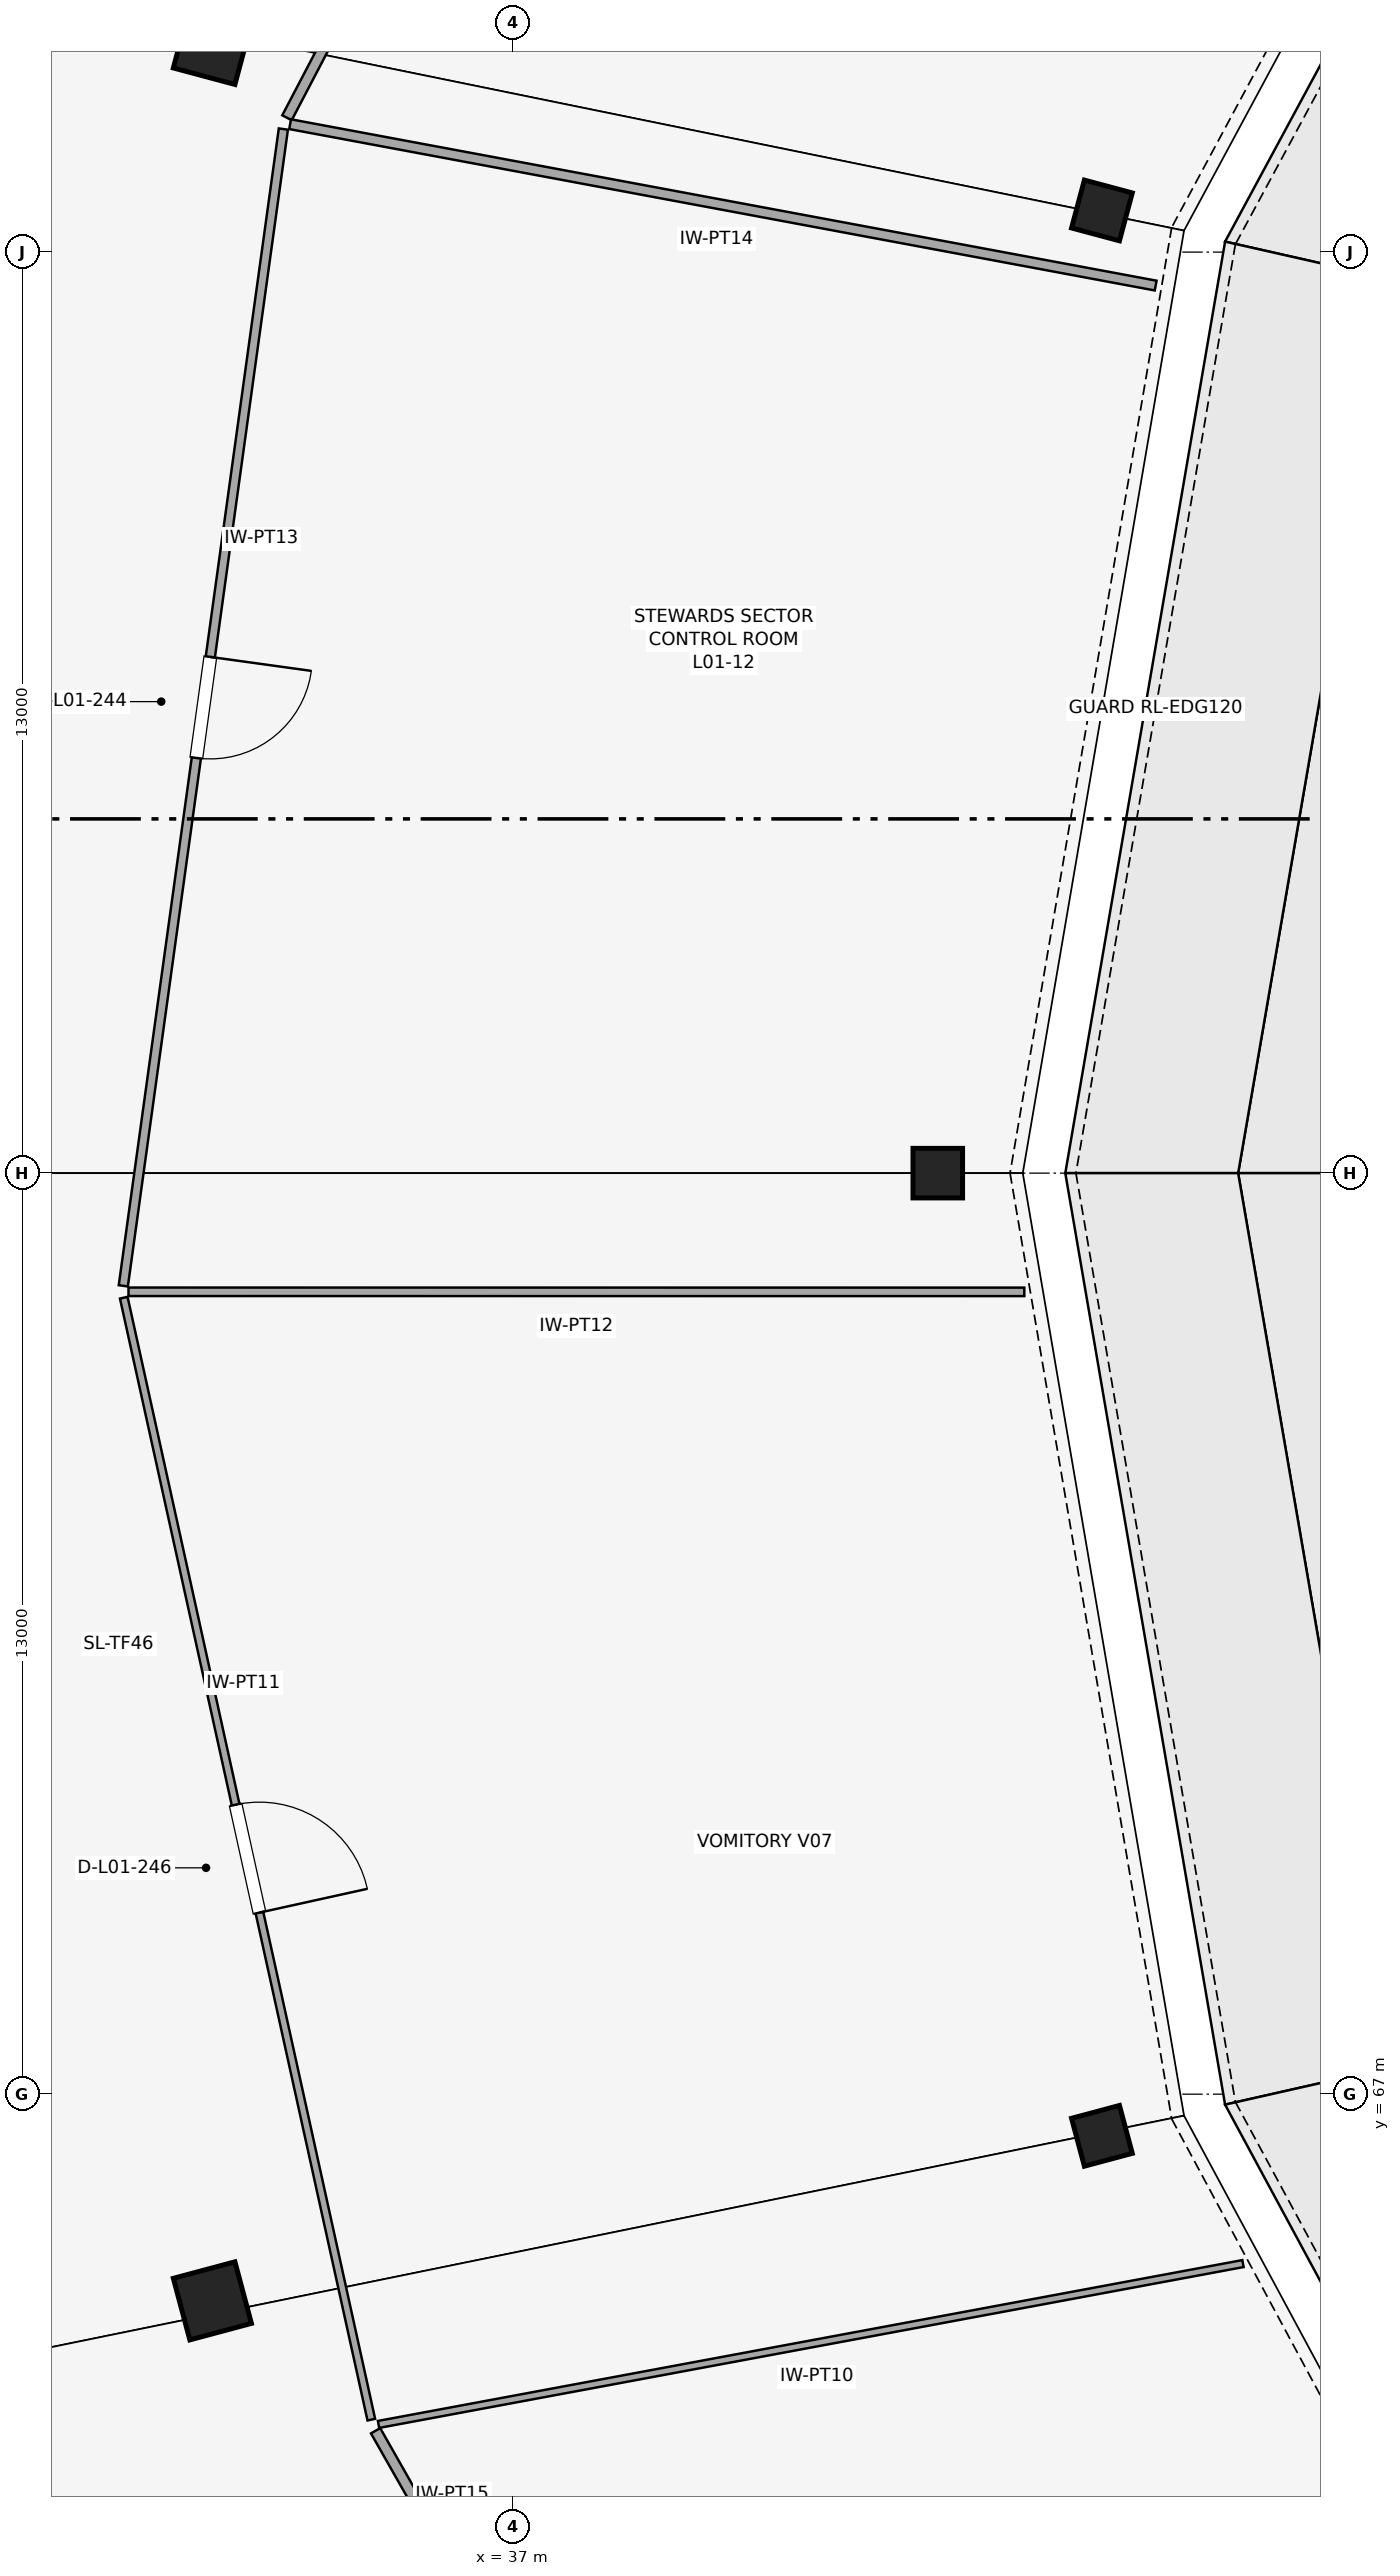
"""IFC4 building model, lengths in metres.
Left out: names, types, materials, properties, quantities, classifications, styles, units other than length and angle.
Written with IfcOpenShell. Run it as: python <this file> out.ifc"""

import sys

from ifc_helpers import new_model, si_unit, direction, frame, frame_2d, origin, origin_2d, place, context, subcontext, project, spatial, rectangle, extrude, element, fill, save


model = new_model("IFC4")
c1 = context("Model", 3, precision=1e-05, world=origin(), true_north=direction((0.0, 1.0)))
c2 = subcontext(c1, "Body", "Model", "MODEL_VIEW")
j1 = project(units=[si_unit("LENGTHUNIT", "METRE"), si_unit("PLANEANGLEUNIT", "RADIAN")], contexts=[c1])
p1 = place(None, origin())
s1 = spatial("IfcSite", under=j1, at=p1, CompositionType="ELEMENT")
p2 = place(p1, origin())
s2 = spatial("IfcBuilding", under=s1, at=p2, CompositionType="ELEMENT")
p3 = place(p2, frame((0.0, 0.0, 5.4)))
s3 = spatial("IfcBuildingStorey", under=s2, at=p3, CompositionType="ELEMENT", Elevation=5.4)
for number, where, z_axis, x_axis in (
    (1, (45.317, 93.588, 0.0), (0.0, 0.0, 1.0), (-0.966, 0.259, 0.0)),
    (2, (43.0, 80.0, 0.0), (0.0, 0.0, 1.0), (-1.0, 0.0, 0.0)),
    (3, (45.317, 66.412, 0.0), (0.0, 0.0, 1.0), (-0.966, -0.259, 0.0)),
):
    element("IfcColumn", number, at=place(p3, frame(where, z_axis=z_axis, x_axis=x_axis)), inside=s3, PredefinedType="COLUMN", context=c2, shape_type="SweptSolid", body=[
        extrude(rectangle(XDim=0.7, YDim=0.7, at=origin_2d()), origin(), (0.0, 0.0, 1.0), 5.2),
    ])
for number, where, z_axis, x_axis in (
    (4, (32.76, 95.917, 0.0), (0.0, 0.0, 1.0), (-0.966, 0.259, 0.0)),
    (5, (32.76, 64.083, 0.0), (0.0, 0.0, 1.0), (-0.966, -0.259, 0.0)),
):
    element("IfcColumn", number, at=place(p3, frame(where, z_axis=z_axis, x_axis=x_axis)), inside=s3, PredefinedType="COLUMN", context=c2, shape_type="SweptSolid", body=[
        extrude(rectangle(XDim=0.9, YDim=0.9, at=origin_2d()), origin(), (0.0, 0.0, 1.0), 5.2),
    ])
p4 = place(p3, frame((40.965, 108.551, 0.0), z_axis=(0.0, 0.0, 1.0), x_axis=(-0.463973851802, -0.88584889504, 0.0)))
e6 = element("IfcWall", 6, at=p4, inside=s3, PredefinedType="PARTITIONING", context=c2, shape_type="SweptSolid", body=[
    extrude(rectangle(XDim=15.414, YDim=0.15, at=frame_2d((7.707, 0.0))), origin(), (0.0, 0.0, 1.0), 3.67),
])
p5 = place(p4, frame((7.197, 0.0, 0.0)))
e7 = element("IfcOpeningElement", 7, at=p5, cuts=e6, PredefinedType="OPENING", context=c2, shape_type="SweptSolid", body=[
    extrude(rectangle(XDim=1.02, YDim=2.24, at=frame_2d((0.51, 1.12))), frame((0.0, 0.085, 0.0), z_axis=(0.0, -1.0, 0.0), x_axis=(1.0, 0.0, 0.0)), (0.0, 0.0, 1.0), 0.17),
])
p6 = place(p3, frame((46.075, 92.528, 0.0), z_axis=(0.0, 0.0, 1.0), x_axis=(-0.983061798628, 0.183274384678, 0.0)))
e8 = element("IfcWall", 8, at=p6, inside=s3, PredefinedType="PARTITIONING", context=c2, shape_type="SweptSolid", body=[
    extrude(rectangle(XDim=12.428, YDim=0.14, at=frame_2d((6.214, 0.0))), origin(), (0.0, 0.0, 1.0), 3.67),
])
p7 = place(p3, frame((33.762, 94.737, 0.0), z_axis=(0.0, 0.0, 1.0), x_axis=(-0.137065413617, -0.990561998257, 0.0)))
e9 = element("IfcWall", 9, at=p7, inside=s3, PredefinedType="PARTITIONING", context=c2, shape_type="SweptSolid", body=[
    extrude(rectangle(XDim=16.483, YDim=0.13, at=frame_2d((8.242, 0.0))), origin(), (0.0, 0.0, 1.0), 3.67),
])
p8 = place(p7, frame((7.521, 0.0, 0.0)))
e10 = element("IfcOpeningElement", 10, at=p8, cuts=e9, PredefinedType="OPENING", context=c2, shape_type="SweptSolid", body=[
    extrude(rectangle(XDim=1.44, YDim=2.24, at=frame_2d((0.72, 1.12))), frame((0.0, 0.075, 0.0), z_axis=(0.0, -1.0, 0.0), x_axis=(1.0, 0.0, 0.0)), (0.0, 0.0, 1.0), 0.15),
])
p9 = place(p3, frame((44.221, 78.324, 0.0), z_axis=(0.0, 0.0, 1.0), x_axis=(-0.999999997018, 7.722604e-05, 0.0)))
e11 = element("IfcWall", 11, at=p9, inside=s3, PredefinedType="PARTITIONING", context=c2, shape_type="SweptSolid", body=[
    extrude(rectangle(XDim=12.646, YDim=0.12, at=frame_2d((6.323, 0.0))), origin(), (0.0, 0.0, 1.0), 3.67),
])
p10 = place(p3, frame((31.509, 78.242, 0.0), z_axis=(0.0, 0.0, 1.0), x_axis=(0.215474890511, -0.976509381194, 0.0)))
e12 = element("IfcWall", 12, at=p10, inside=s3, PredefinedType="PARTITIONING", context=c2, shape_type="SweptSolid", body=[
    extrude(rectangle(XDim=16.217, YDim=0.11, at=frame_2d((8.108, 0.0))), origin(), (0.0, 0.0, 1.0), 3.67),
])
p11 = place(p10, frame((7.329, 0.0, 0.0)))
e13 = element("IfcOpeningElement", 13, at=p11, cuts=e12, PredefinedType="OPENING", context=c2, shape_type="SweptSolid", body=[
    extrude(rectangle(XDim=1.56, YDim=2.1, at=frame_2d((0.78, 1.05))), frame((0.0, 0.065, 0.0), z_axis=(0.0, -1.0, 0.0), x_axis=(1.0, 0.0, 0.0)), (0.0, 0.0, 1.0), 0.13),
])
p12 = place(p3, frame((47.308, 64.609, 0.0), z_axis=(0.0, 0.0, 1.0), x_axis=(-0.983126430001, -0.182927369833, 0.0)))
e14 = element("IfcWall", 14, at=p12, inside=s3, PredefinedType="PARTITIONING", context=c2, shape_type="SweptSolid", body=[
    extrude(rectangle(XDim=12.412, YDim=0.1, at=frame_2d((6.206, 0.0))), origin(), (0.0, 0.0, 1.0), 3.67),
])
p13 = place(p3, frame((35.064, 62.249, 0.0), z_axis=(0.0, 0.0, 1.0), x_axis=(0.494328358442, -0.869275257925, 0.0)))
e15 = element("IfcWall", 15, at=p13, inside=s3, PredefinedType="PARTITIONING", context=c2, shape_type="SweptSolid", body=[
    extrude(rectangle(XDim=2.63, YDim=0.15, at=frame_2d((1.315, 0.0))), origin(), (0.0, 0.0, 1.0), 3.67),
])
p14 = place(p8, origin())
e16 = element("IfcDoor", 16, at=p14, inside=s3, OperationType="SINGLE_SWING_LEFT", PredefinedType="DOOR", context=c2, shape_type="SweptSolid", body=[
    extrude(rectangle(XDim=1.44, YDim=2.24, at=frame_2d((0.72, 1.12))), frame((0.0, 0.025, 0.0), z_axis=(0.0, -1.0, 0.0), x_axis=(1.0, 0.0, 0.0)), (0.0, 0.0, 1.0), 0.05),
])
fill(e10, e16)
p15 = place(p11, origin())
e17 = element("IfcDoor", 17, at=p15, inside=s3, OperationType="SINGLE_SWING_RIGHT", PredefinedType="DOOR", context=c2, shape_type="SweptSolid", body=[
    extrude(rectangle(XDim=1.56, YDim=2.1, at=frame_2d((0.78, 1.05))), frame((0.0, 0.025, 0.0), z_axis=(0.0, -1.0, 0.0), x_axis=(1.0, 0.0, 0.0)), (0.0, 0.0, 1.0), 0.05),
])
fill(e13, e17)
save(model, sys.argv[1])
